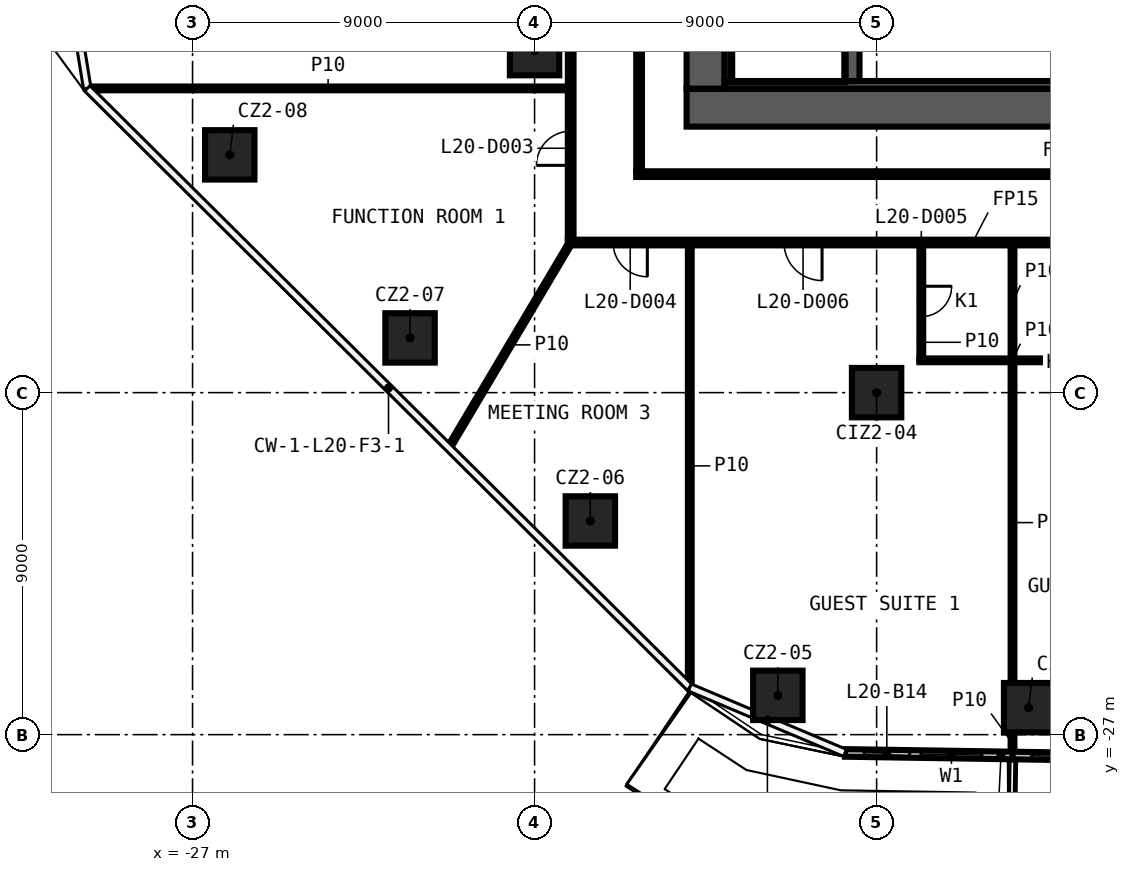
"""IFC4 building model, lengths in metres.
Left out: names, types, materials, properties, quantities, classifications, styles, units other than length and angle.
Written with IfcOpenShell. Run it as: python <this file> out.ifc"""

import sys

from ifc_helpers import new_model, si_unit, direction, frame, frame_2d, origin, origin_2d, place, context, subcontext, project, spatial, rectangle, extrude, element, fill, save


model = new_model("IFC4")
c1 = context("Model", 3, precision=1e-05, world=origin(), true_north=direction((0.0, 1.0)))
c2 = subcontext(c1, "Body", "Model", "MODEL_VIEW")
j1 = project(units=[si_unit("LENGTHUNIT", "METRE"), si_unit("PLANEANGLEUNIT", "RADIAN")], contexts=[c1])
p1 = place(None, origin())
s1 = spatial("IfcSite", under=j1, at=p1, CompositionType="ELEMENT")
p2 = place(p1, origin())
s2 = spatial("IfcBuilding", under=s1, at=p2, CompositionType="ELEMENT")
p3 = place(p2, frame((0.0, 0.0, 98.9)))
s3 = spatial("IfcBuildingStorey", under=s2, at=p3, CompositionType="ELEMENT", Elevation=98.9)
for number, where, z_axis, x_axis in (
    (1, (-5.0, -26.29, 0.0), (0.0, 0.0, 1.0), (1.0, 0.0, 0.0)),
    (2, (-11.599, -25.966, 0.0), (0.0, 0.0, 1.0), (1.0, 0.0, 0.0)),
    (3, (-16.533, -21.377, 0.0), (0.0, 0.0, 1.0), (1.0, 0.0, 0.0)),
    (4, (-21.277, -16.56, 0.0), (0.0, 0.0, 1.0), (1.0, 0.0, 0.0)),
    (5, (-26.021, -11.743, 0.0), (0.0, 0.0, 1.0), (1.0, 0.0, 0.0)),
    (6, (-18.0, -9.0, 0.0), (0.0, 0.0, 1.0), (1.0, 0.0, 0.0)),
    (7, (-9.0, -18.0, 0.0), (0.0, 0.0, 1.0), (1.0, 0.0, 0.0)),
):
    element("IfcColumn", number, at=place(p3, frame(where, z_axis=z_axis, x_axis=x_axis)), inside=s3, PredefinedType="COLUMN", context=c2, shape_type="SweptSolid", body=[
        extrude(rectangle(XDim=1.3, YDim=1.3, at=origin_2d()), origin(), (0.0, 0.0, 1.0), 3.25),
    ])
p4 = place(p3, frame((-7.874, -17.15, 0.0), z_axis=(0.0, 0.0, 1.0), x_axis=(1.0, 0.0, 0.0)))
e8 = element("IfcWall", 8, at=p4, inside=s3, PredefinedType="PARTITIONING", context=c2, shape_type="SweptSolid", body=[
    extrude(rectangle(XDim=4.9, YDim=0.1, at=frame_2d((2.45, 0.0))), origin(), (0.0, 0.0, 1.0), 3.25),
])
p5 = place(p3, frame((17.125, -14.05, 0.0), z_axis=(0.0, 0.0, 1.0), x_axis=(-1.0, 0.0, 0.0)))
e9 = element("IfcWall", 9, at=p5, inside=s3, PredefinedType="PARTITIONING", context=c2, shape_type="SweptSolid", body=[
    extrude(rectangle(XDim=34.25, YDim=0.15, at=frame_2d((17.125, 0.0))), origin(), (0.0, 0.0, 1.0), 3.25),
])
p6 = place(p5, frame((32.158, 0.0, 0.0)))
e10 = element("IfcOpeningElement", 10, at=p6, cuts=e9, PredefinedType="OPENING", context=c2, shape_type="SweptSolid", body=[
    extrude(rectangle(XDim=0.9, YDim=2.1, at=frame_2d((0.45, 1.05))), frame((0.0, 0.085, 0.0), z_axis=(0.0, -1.0, 0.0), x_axis=(1.0, 0.0, 0.0)), (0.0, 0.0, 1.0), 0.17),
])
p7 = place(p5, frame((27.561, 0.0, 0.0)))
e11 = element("IfcOpeningElement", 11, at=p7, cuts=e9, PredefinedType="OPENING", context=c2, shape_type="SweptSolid", body=[
    extrude(rectangle(XDim=1.0, YDim=2.1, at=frame_2d((0.5, 1.05))), frame((0.0, 0.085, 0.0), z_axis=(0.0, -1.0, 0.0), x_axis=(1.0, 0.0, 0.0)), (0.0, 0.0, 1.0), 0.17),
])
p8 = place(p5, frame((18.64, 0.0, 0.0)))
e12 = element("IfcOpeningElement", 12, at=p8, cuts=e9, PredefinedType="OPENING", context=c2, shape_type="SweptSolid", body=[
    extrude(rectangle(XDim=1.0, YDim=2.1, at=frame_2d((0.5, 1.05))), frame((0.0, 0.085, 0.0), z_axis=(0.0, -1.0, 0.0), x_axis=(1.0, 0.0, 0.0)), (0.0, 0.0, 1.0), 0.17),
])
p9 = place(p5, frame((16.624, 0.0, 0.0)))
e13 = element("IfcOpeningElement", 13, at=p9, cuts=e9, PredefinedType="OPENING", context=c2, shape_type="SweptSolid", body=[
    extrude(rectangle(XDim=1.0, YDim=2.1, at=frame_2d((0.5, 1.05))), frame((0.0, 0.085, 0.0), z_axis=(0.0, -1.0, 0.0), x_axis=(1.0, 0.0, 0.0)), (0.0, 0.0, 1.0), 0.17),
])
p10 = place(p5, frame((9.807, 0.0, 0.0)))
e14 = element("IfcOpeningElement", 14, at=p10, cuts=e9, PredefinedType="OPENING", context=c2, shape_type="SweptSolid", body=[
    extrude(rectangle(XDim=1.0, YDim=2.1, at=frame_2d((0.5, 1.05))), frame((0.0, 0.085, 0.0), z_axis=(0.0, -1.0, 0.0), x_axis=(1.0, 0.0, 0.0)), (0.0, 0.0, 1.0), 0.17),
])
p11 = place(p5, frame((7.795, 0.0, 0.0)))
e15 = element("IfcOpeningElement", 15, at=p11, cuts=e9, PredefinedType="OPENING", context=c2, shape_type="SweptSolid", body=[
    extrude(rectangle(XDim=1.0, YDim=2.1, at=frame_2d((0.5, 1.05))), frame((0.0, 0.085, 0.0), z_axis=(0.0, -1.0, 0.0), x_axis=(1.0, 0.0, 0.0)), (0.0, 0.0, 1.0), 0.17),
])
p12 = place(p5, frame((1.119, 0.0, 0.0)))
e16 = element("IfcOpeningElement", 16, at=p12, cuts=e9, PredefinedType="OPENING", context=c2, shape_type="SweptSolid", body=[
    extrude(rectangle(XDim=1.0, YDim=2.1, at=frame_2d((0.5, 1.05))), frame((0.0, 0.085, 0.0), z_axis=(0.0, -1.0, 0.0), x_axis=(1.0, 0.0, 0.0)), (0.0, 0.0, 1.0), 0.17),
])
p13 = place(p3, frame((-15.325, -12.25, 0.0), z_axis=(0.0, 0.0, 1.0), x_axis=(1.0, 0.0, 0.0)))
e17 = element("IfcWall", 17, at=p13, inside=s3, PredefinedType="PARTITIONING", context=c2, shape_type="SweptSolid", body=[
    extrude(rectangle(XDim=22.6, YDim=0.15, at=frame_2d((11.3, 0.0))), origin(), (0.0, 0.0, 1.0), 3.25),
])
p14 = place(p3, frame((-29.742, -9.994, 0.0), z_axis=(0.0, 0.0, 1.0), x_axis=(1.0, 0.0, 0.0)))
e18 = element("IfcWall", 18, at=p14, inside=s3, PredefinedType="PARTITIONING", context=c2, shape_type="SweptSolid", body=[
    extrude(rectangle(XDim=12.617, YDim=0.1, at=frame_2d((6.308, 0.0))), origin(), (0.0, 0.0, 1.0), 3.25),
])
p15 = place(p3, frame((-20.246, -19.436, 0.0), z_axis=(0.0, 0.0, 1.0), x_axis=(0.510253226363, 0.86002421186, 0.0)))
e19 = element("IfcWall", 19, at=p15, inside=s3, PredefinedType="PARTITIONING", context=c2, shape_type="SweptSolid", body=[
    extrude(rectangle(XDim=6.263, YDim=0.1, at=frame_2d((3.132, 0.0))), origin(), (0.0, 0.0, 1.0), 3.25),
])
p16 = place(p3, frame((-5.424, -27.529, 0.0), z_axis=(0.0, 0.0, 1.0), x_axis=(0.0, 1.0, 0.0)))
e20 = element("IfcWall", 20, at=p16, inside=s3, PredefinedType="PARTITIONING", context=c2, shape_type="SweptSolid", body=[
    extrude(rectangle(XDim=0.589, YDim=0.1, at=frame_2d((0.294, 0.0))), origin(), (0.0, 0.0, 1.0), 3.25),
])
p17 = place(p3, frame((-5.424, -25.64, 0.0), z_axis=(0.0, 0.0, 1.0), x_axis=(0.0, 1.0, 0.0)))
e21 = element("IfcWall", 21, at=p17, inside=s3, PredefinedType="PARTITIONING", context=c2, shape_type="SweptSolid", body=[
    extrude(rectangle(XDim=8.44, YDim=0.1, at=frame_2d((4.22, 0.0))), origin(), (0.0, 0.0, 1.0), 3.25),
])
p18 = place(p3, frame((-5.424, -17.1, 0.0), z_axis=(0.0, 0.0, 1.0), x_axis=(0.0, 1.0, 0.0)))
e22 = element("IfcWall", 22, at=p18, inside=s3, PredefinedType="PARTITIONING", context=c2, shape_type="SweptSolid", body=[
    extrude(rectangle(XDim=2.975, YDim=0.1, at=frame_2d((1.488, 0.0))), origin(), (0.0, 0.0, 1.0), 3.25),
])
p19 = place(p3, frame((-7.824, -14.125, 0.0), z_axis=(0.0, 0.0, 1.0), x_axis=(0.0, -1.0, 0.0)))
e23 = element("IfcWall", 23, at=p19, inside=s3, PredefinedType="PARTITIONING", context=c2, shape_type="SweptSolid", body=[
    extrude(rectangle(XDim=3.025, YDim=0.1, at=frame_2d((1.512, 0.0))), origin(), (0.0, 0.0, 1.0), 3.25),
])
p20 = place(p19, frame((1.075, 0.0, 0.0)))
e24 = element("IfcOpeningElement", 24, at=p20, cuts=e23, PredefinedType="OPENING", context=c2, shape_type="SweptSolid", body=[
    extrude(rectangle(XDim=0.8, YDim=2.1, at=frame_2d((0.4, 1.05))), frame((0.0, 0.06, 0.0), z_axis=(0.0, -1.0, 0.0), x_axis=(1.0, 0.0, 0.0)), (0.0, 0.0, 1.0), 0.12),
])
p21 = place(p3, frame((-13.916, -25.73, 0.0), z_axis=(0.0, 0.0, 1.0), x_axis=(0.0, 1.0, 0.0)))
e25 = element("IfcWall", 25, at=p21, inside=s3, PredefinedType="PARTITIONING", context=c2, shape_type="SweptSolid", body=[
    extrude(rectangle(XDim=11.605, YDim=0.1, at=frame_2d((5.802, 0.0))), origin(), (0.0, 0.0, 1.0), 3.25),
])
p22 = place(p3, frame((-15.25, 12.175, 0.0), z_axis=(0.0, 0.0, 1.0), x_axis=(0.0, -1.0, 0.0)))
e26 = element("IfcWall", 26, at=p22, inside=s3, PredefinedType="PARTITIONING", context=c2, shape_type="SweptSolid", body=[
    extrude(rectangle(XDim=24.35, YDim=0.15, at=frame_2d((12.175, 0.0))), origin(), (0.0, 0.0, 1.0), 3.25),
])
p23 = place(p22, frame((11.725, 0.0, 0.0)))
e27 = element("IfcOpeningElement", 27, at=p23, cuts=e26, PredefinedType="OPENING", context=c2, shape_type="SweptSolid", body=[
    extrude(rectangle(XDim=0.9, YDim=2.1, at=frame_2d((0.45, 1.05))), frame((0.0, 0.085, 0.0), z_axis=(0.0, -1.0, 0.0), x_axis=(1.0, 0.0, 0.0)), (0.0, 0.0, 1.0), 0.17),
])
p24 = place(p3, frame((-17.05, -13.975, 0.0), z_axis=(0.0, 0.0, 1.0), x_axis=(0.0, 1.0, 0.0)))
e28 = element("IfcWall", 28, at=p24, inside=s3, PredefinedType="PARTITIONING", context=c2, shape_type="SweptSolid", body=[
    extrude(rectangle(XDim=27.95, YDim=0.15, at=frame_2d((13.975, 0.0))), origin(), (0.0, 0.0, 1.0), 3.25),
])
p25 = place(p24, frame((11.195, 0.0, 0.0)))
e29 = element("IfcOpeningElement", 29, at=p25, cuts=e28, PredefinedType="OPENING", context=c2, shape_type="SweptSolid", body=[
    extrude(rectangle(XDim=0.9, YDim=2.1, at=frame_2d((0.45, 1.05))), frame((0.0, 0.085, 0.0), z_axis=(0.0, -1.0, 0.0), x_axis=(1.0, 0.0, 0.0)), (0.0, 0.0, 1.0), 0.17),
])
p26 = place(p24, frame((8.57, 0.0, 0.0)))
e30 = element("IfcOpeningElement", 30, at=p26, cuts=e28, PredefinedType="OPENING", context=c2, shape_type="SweptSolid", body=[
    extrude(rectangle(XDim=0.9, YDim=2.1, at=frame_2d((0.45, 1.05))), frame((0.0, 0.085, 0.0), z_axis=(0.0, -1.0, 0.0), x_axis=(1.0, 0.0, 0.0)), (0.0, 0.0, 1.0), 0.17),
])
p27 = place(p24, frame((1.956, 0.0, 0.0)))
e31 = element("IfcOpeningElement", 31, at=p27, cuts=e28, PredefinedType="OPENING", context=c2, shape_type="SweptSolid", body=[
    extrude(rectangle(XDim=0.9, YDim=2.1, at=frame_2d((0.45, 1.05))), frame((0.0, 0.085, 0.0), z_axis=(0.0, -1.0, 0.0), x_axis=(1.0, 0.0, 0.0)), (0.0, 0.0, 1.0), 0.17),
])
p28 = place(p24, frame((25.181, 0.0, 0.0)))
e32 = element("IfcOpeningElement", 32, at=p28, cuts=e28, PredefinedType="OPENING", context=c2, shape_type="SweptSolid", body=[
    extrude(rectangle(XDim=0.9, YDim=2.1, at=frame_2d((0.45, 1.05))), frame((0.0, 0.085, 0.0), z_axis=(0.0, -1.0, 0.0), x_axis=(1.0, 0.0, 0.0)), (0.0, 0.0, 1.0), 0.17),
])
p29 = place(p24, frame((20.101, 0.0, 0.0)))
e33 = element("IfcOpeningElement", 33, at=p29, cuts=e28, PredefinedType="OPENING", context=c2, shape_type="SweptSolid", body=[
    extrude(rectangle(XDim=0.9, YDim=2.1, at=frame_2d((0.45, 1.05))), frame((0.0, 0.085, 0.0), z_axis=(0.0, -1.0, 0.0), x_axis=(1.0, 0.0, 0.0)), (0.0, 0.0, 1.0), 0.17),
])
p30 = place(p24, frame((16.206, 0.0, 0.0)))
e34 = element("IfcOpeningElement", 34, at=p30, cuts=e28, PredefinedType="OPENING", context=c2, shape_type="SweptSolid", body=[
    extrude(rectangle(XDim=0.9, YDim=2.1, at=frame_2d((0.45, 1.05))), frame((0.0, 0.085, 0.0), z_axis=(0.0, -1.0, 0.0), x_axis=(1.0, 0.0, 0.0)), (0.0, 0.0, 1.0), 0.17),
])
p31 = place(p3, frame((-5.424, -27.549, 0.0), z_axis=(0.0, 0.0, 1.0), x_axis=(0.999881101657, -0.015420199401, 0.0)))
e35 = element("IfcWall", 35, at=p31, inside=s3, PredefinedType="SOLIDWALL", context=c2, shape_type="SweptSolid", body=[
    extrude(rectangle(XDim=8.834, YDim=0.2, at=frame_2d((4.417, 0.0))), origin(), (0.0, 0.0, 1.0), 3.25),
])
p32 = place(p31, frame((0.5, 0.0, 0.6)))
e36 = element("IfcOpeningElement", 36, at=p32, cuts=e35, PredefinedType="OPENING", context=c2, shape_type="SweptSolid", body=[
    extrude(rectangle(XDim=1.6, YDim=2.4, at=frame_2d((0.8, 1.2))), frame((0.0, 0.11, 0.0), z_axis=(0.0, -1.0, 0.0), x_axis=(1.0, 0.0, 0.0)), (0.0, 0.0, 1.0), 0.22),
])
p33 = place(p31, frame((2.4, 0.0, 0.0)))
e37 = element("IfcOpeningElement", 37, at=p33, cuts=e35, PredefinedType="OPENING", context=c2, shape_type="SweptSolid", body=[
    extrude(rectangle(XDim=1.2, YDim=2.4, at=frame_2d((0.6, 1.2))), frame((0.0, 0.11, 0.0), z_axis=(0.0, -1.0, 0.0), x_axis=(1.0, 0.0, 0.0)), (0.0, 0.0, 1.0), 0.22),
])
p34 = place(p31, frame((6.417, 0.0, 0.6)))
e38 = element("IfcOpeningElement", 38, at=p34, cuts=e35, PredefinedType="OPENING", context=c2, shape_type="SweptSolid", body=[
    extrude(rectangle(XDim=1.6, YDim=2.4, at=frame_2d((0.8, 1.2))), frame((0.0, 0.11, 0.0), z_axis=(0.0, -1.0, 0.0), x_axis=(1.0, 0.0, 0.0)), (0.0, 0.0, 1.0), 0.22),
])
p35 = place(p31, frame((4.917, 0.0, 0.0)))
e39 = element("IfcOpeningElement", 39, at=p35, cuts=e35, PredefinedType="OPENING", context=c2, shape_type="SweptSolid", body=[
    extrude(rectangle(XDim=1.2, YDim=2.4, at=frame_2d((0.6, 1.2))), frame((0.0, 0.11, 0.0), z_axis=(0.0, -1.0, 0.0), x_axis=(1.0, 0.0, 0.0)), (0.0, 0.0, 1.0), 0.22),
])
p36 = place(p3, frame((-9.831, -27.481, 0.0), z_axis=(0.0, 0.0, 1.0), x_axis=(0.99988144177, -0.015398129892, 0.0)))
e40 = element("IfcWall", 40, at=p36, inside=s3, PredefinedType="SOLIDWALL", context=c2, shape_type="SweptSolid", body=[
    extrude(rectangle(XDim=4.408, YDim=0.2, at=frame_2d((2.204, 0.0))), origin(), (0.0, 0.0, 1.0), 3.25),
])
p37 = place(p36, frame((2.0, 0.0, 0.6)))
e41 = element("IfcOpeningElement", 41, at=p37, cuts=e40, PredefinedType="OPENING", context=c2, shape_type="SweptSolid", body=[
    extrude(rectangle(XDim=1.6, YDim=2.4, at=frame_2d((0.8, 1.2))), frame((0.0, 0.11, 0.0), z_axis=(0.0, -1.0, 0.0), x_axis=(1.0, 0.0, 0.0)), (0.0, 0.0, 1.0), 0.22),
])
p38 = place(p36, frame((0.5, 0.0, 0.0)))
e42 = element("IfcOpeningElement", 42, at=p38, cuts=e40, PredefinedType="OPENING", context=c2, shape_type="SweptSolid", body=[
    extrude(rectangle(XDim=1.2, YDim=2.4, at=frame_2d((0.6, 1.2))), frame((0.0, 0.11, 0.0), z_axis=(0.0, -1.0, 0.0), x_axis=(1.0, 0.0, 0.0)), (0.0, 0.0, 1.0), 0.22),
])
p39 = place(p3, frame((14.0, -10.5, 0.0), z_axis=(0.0, 0.0, 1.0), x_axis=(-1.0, 0.0, 0.0)))
e43 = element("IfcWall", 43, at=p39, inside=s3, PredefinedType="SHEAR", context=c2, shape_type="SweptSolid", body=[
    extrude(rectangle(XDim=28.0, YDim=1.0, at=frame_2d((14.0, 0.0))), origin(), (0.0, 0.0, 1.0), 3.25),
])
p40 = place(p39, frame((5.1, 0.0, 0.0)))
e44 = element("IfcOpeningElement", 44, at=p40, cuts=e43, PredefinedType="OPENING", context=c2, shape_type="SweptSolid", body=[
    extrude(rectangle(XDim=1.6, YDim=2.1, at=frame_2d((0.8, 1.05))), frame((0.0, 0.51, 0.0), z_axis=(0.0, -1.0, 0.0), x_axis=(1.0, 0.0, 0.0)), (0.0, 0.0, 1.0), 1.02),
])
p41 = place(p3, frame((-13.5, -10.0, 0.0), z_axis=(0.0, 0.0, 1.0), x_axis=(0.0, 1.0, 0.0)))
e45 = element("IfcWall", 45, at=p41, inside=s3, PredefinedType="SHEAR", context=c2, shape_type="SweptSolid", body=[
    extrude(rectangle(XDim=20.0, YDim=1.0, at=frame_2d((10.0, 0.0))), origin(), (0.0, 0.0, 1.0), 3.25),
])
p42 = place(p3, frame((6.9, -9.9, 0.0), z_axis=(0.0, 0.0, 1.0), x_axis=(-1.0, 0.0, 0.0)))
e46 = element("IfcWall", 46, at=p42, inside=s3, PredefinedType="SHEAR", context=c2, shape_type="SweptSolid", body=[
    extrude(rectangle(XDim=19.9, YDim=0.2, at=frame_2d((9.95, 0.0))), origin(), (0.0, 0.0, 1.0), 3.25),
])
p43 = place(p3, frame((-12.9, -9.8, 0.0), z_axis=(0.0, 0.0, 1.0), x_axis=(0.0, 1.0, 0.0)))
e47 = element("IfcWall", 47, at=p43, inside=s3, PredefinedType="SHEAR", context=c2, shape_type="SweptSolid", body=[
    extrude(rectangle(XDim=19.6, YDim=0.2, at=frame_2d((9.8, 0.0))), origin(), (0.0, 0.0, 1.0), 3.25),
])
p44 = place(p3, frame((-9.65, -9.8, 0.0), z_axis=(0.0, 0.0, 1.0), x_axis=(0.0, 1.0, 0.0)))
e48 = element("IfcWall", 48, at=p44, inside=s3, PredefinedType="SHEAR", context=c2, shape_type="SweptSolid", body=[
    extrude(rectangle(XDim=7.5, YDim=0.4, at=frame_2d((3.75, 0.0))), origin(), (0.0, 0.0, 1.0), 3.25),
])
p45 = place(p44, frame((5.1, 0.0, 0.0)))
e49 = element("IfcOpeningElement", 49, at=p45, cuts=e48, PredefinedType="OPENING", context=c2, shape_type="SweptSolid", body=[
    extrude(rectangle(XDim=1.2, YDim=2.1, at=frame_2d((0.6, 1.05))), frame((0.0, 0.21, 0.0), z_axis=(0.0, -1.0, 0.0), x_axis=(1.0, 0.0, 0.0)), (0.0, 0.0, 1.0), 0.42),
])
p46 = place(p27, origin())
e50 = element("IfcDoor", 50, at=p46, inside=s3, OperationType="SINGLE_SWING_LEFT", PredefinedType="DOOR", context=c2, shape_type="SweptSolid", body=[
    extrude(rectangle(XDim=0.9, YDim=2.1, at=frame_2d((0.45, 1.05))), frame((0.0, 0.025, 0.0), z_axis=(0.0, -1.0, 0.0), x_axis=(1.0, 0.0, 0.0)), (0.0, 0.0, 1.0), 0.05),
])
fill(e31, e50)
p47 = place(p6, origin())
e51 = element("IfcDoor", 51, at=p47, inside=s3, OperationType="SINGLE_SWING_RIGHT", PredefinedType="DOOR", context=c2, shape_type="SweptSolid", body=[
    extrude(rectangle(XDim=0.9, YDim=2.1, at=frame_2d((0.45, 1.05))), frame((0.0, 0.025, 0.0), z_axis=(0.0, -1.0, 0.0), x_axis=(1.0, 0.0, 0.0)), (0.0, 0.0, 1.0), 0.05),
])
fill(e10, e51)
p48 = place(p20, origin())
e52 = element("IfcDoor", 52, at=p48, inside=s3, OperationType="SINGLE_SWING_RIGHT", PredefinedType="DOOR", context=c2, shape_type="SweptSolid", body=[
    extrude(rectangle(XDim=0.8, YDim=2.1, at=frame_2d((0.4, 1.05))), frame((0.0, 0.025, 0.0), z_axis=(0.0, -1.0, 0.0), x_axis=(1.0, 0.0, 0.0)), (0.0, 0.0, 1.0), 0.05),
])
fill(e24, e52)
p49 = place(p7, origin())
e53 = element("IfcDoor", 53, at=p49, inside=s3, OperationType="SINGLE_SWING_LEFT", PredefinedType="DOOR", context=c2, shape_type="SweptSolid", body=[
    extrude(rectangle(XDim=1.0, YDim=2.1, at=frame_2d((0.5, 1.05))), frame((0.0, 0.025, 0.0), z_axis=(0.0, -1.0, 0.0), x_axis=(1.0, 0.0, 0.0)), (0.0, 0.0, 1.0), 0.05),
])
fill(e11, e53)
p50 = place(p32, origin())
e54 = element("IfcWindow", 54, at=p50, inside=s3, PartitioningType="SINGLE_PANEL", PredefinedType="WINDOW", context=c2, shape_type="SweptSolid", body=[
    extrude(rectangle(XDim=1.6, YDim=2.4, at=frame_2d((0.8, 1.2))), frame((0.0, 0.03, 0.0), z_axis=(0.0, -1.0, 0.0), x_axis=(1.0, 0.0, 0.0)), (0.0, 0.0, 1.0), 0.06),
])
fill(e36, e54)
p51 = place(p37, origin())
e55 = element("IfcWindow", 55, at=p51, inside=s3, PartitioningType="SINGLE_PANEL", PredefinedType="WINDOW", context=c2, shape_type="SweptSolid", body=[
    extrude(rectangle(XDim=1.6, YDim=2.4, at=frame_2d((0.8, 1.2))), frame((0.0, 0.03, 0.0), z_axis=(0.0, -1.0, 0.0), x_axis=(1.0, 0.0, 0.0)), (0.0, 0.0, 1.0), 0.06),
])
fill(e41, e55)
p52 = place(p38, origin())
e56 = element("IfcDoor", 56, at=p52, inside=s3, OperationType="SLIDING_TO_LEFT", PredefinedType="DOOR", context=c2, shape_type="SweptSolid", body=[
    extrude(rectangle(XDim=1.2, YDim=2.4, at=frame_2d((0.6, 1.2))), frame((0.0, 0.025, 0.0), z_axis=(0.0, -1.0, 0.0), x_axis=(1.0, 0.0, 0.0)), (0.0, 0.0, 1.0), 0.05),
])
fill(e42, e56)
save(model, sys.argv[1])
